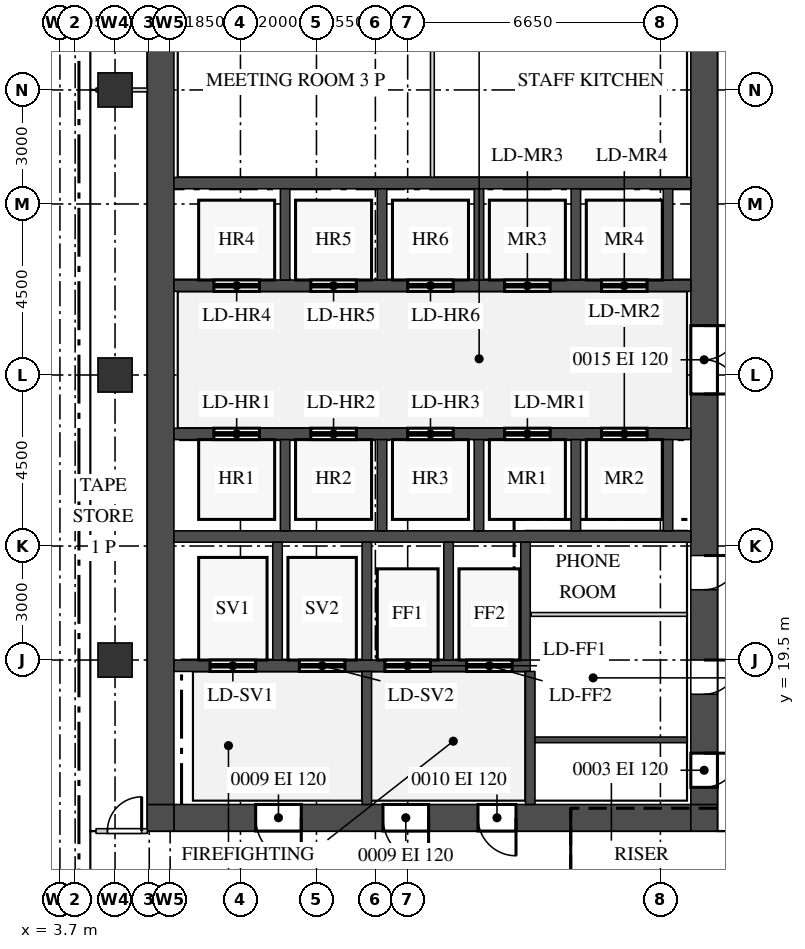
"""IFC4 building model, lengths in metres.
Left out: names, types, materials, properties, quantities, classifications, styles, units other than length and angle.
Written with IfcOpenShell. Run it as: python <this file> out.ifc"""

import sys

from ifc_helpers import new_model, si_unit, direction, frame, frame_2d, origin, origin_2d, place, context, subcontext, project, spatial, rectangle, extrude, source, transform, mapped, element, fill, save


model = new_model("IFC4")
c1 = context("Model", 3, precision=1e-05, world=origin(), true_north=direction((0.0, 1.0)))
c2 = subcontext(c1, "Body", "Model", "MODEL_VIEW")
j1 = project(units=[si_unit("LENGTHUNIT", "METRE"), si_unit("PLANEANGLEUNIT", "RADIAN")], contexts=[c1])
p1 = place(None, origin())
s1 = spatial("IfcSite", under=j1, at=p1, CompositionType="ELEMENT")
p2 = place(p1, origin())
s2 = spatial("IfcBuilding", under=s1, at=p2, CompositionType="ELEMENT")
p3 = place(p2, frame((0.0, 0.0, 246.2)))
s3 = spatial("IfcBuildingStorey", under=s2, at=p3, CompositionType="ELEMENT", Elevation=246.2)
m1 = source(origin(), c2, "Body", "SweptSolid", [
    extrude(rectangle(XDim=13.6, YDim=0.7, at=frame_2d((6.8, 0.0))), origin(), (0.0, 0.0, 1.0), 3.75),
])
p4 = place(p3, frame((6.7, 15.35, 0.0), z_axis=(0.0, 0.0, 1.0), x_axis=(1.0, 0.0, 0.0)))
e1 = element("IfcWall", 1, at=p4, inside=s3, PredefinedType="SHEAR", context=c2, shape_type="MappedRepresentation", body=[
    mapped(m1, transform((0.0, 0.0, 0.0))),
])
m2 = source(origin(), c2, "Body", "SweptSolid", [
    extrude(rectangle(XDim=1.2, YDim=2.1, at=frame_2d((0.6, 1.05))), frame((0.0, 0.36, 0.0), z_axis=(0.0, -1.0, 0.0), x_axis=(1.0, 0.0, 0.0)), (0.0, 0.0, 1.0), 0.72),
])
p5 = place(p4, frame((5.5, 0.0, 0.0)))
e2 = element("IfcOpeningElement", 2, at=p5, cuts=e1, PredefinedType="OPENING", context=c2, shape_type="MappedRepresentation", body=[
    mapped(m2, transform((0.0, 0.0, 0.0))),
])
p6 = place(p4, frame((2.15, 0.0, 0.0)))
e3 = element("IfcOpeningElement", 3, at=p6, cuts=e1, PredefinedType="OPENING", context=c2, shape_type="MappedRepresentation", body=[
    mapped(m2, transform((0.0, 0.0, 0.0))),
])
m3 = source(origin(), c2, "Body", "SweptSolid", [
    extrude(rectangle(XDim=1.0, YDim=2.1, at=frame_2d((0.5, 1.05))), frame((0.0, 0.36, 0.0), z_axis=(0.0, -1.0, 0.0), x_axis=(1.0, 0.0, 0.0)), (0.0, 0.0, 1.0), 0.72),
])
p7 = place(p4, frame((8.0, 0.0, 0.0)))
e4 = element("IfcOpeningElement", 4, at=p7, cuts=e1, PredefinedType="OPENING", context=c2, shape_type="MappedRepresentation", body=[
    mapped(m3, transform((0.0, 0.0, 0.0))),
])
m4 = source(origin(), c2, "Body", "SweptSolid", [
    extrude(rectangle(XDim=0.7, YDim=0.7, at=frame_2d((0.35, 0.0))), origin(), (0.0, 0.0, 1.0), 3.75),
])
for number, where, z_axis, x_axis in (
    (5, (20.3, 15.35, 0.0), (0.0, 0.0, 1.0), (1.0, 0.0, 0.0)),
    (6, (6.0, 15.35, 0.0), (0.0, 0.0, 1.0), (1.0, 0.0, 0.0)),
):
    element("IfcWall", number, at=place(p3, frame(where, z_axis=z_axis, x_axis=x_axis)), inside=s3, PredefinedType="SHEAR", context=c2, shape_type="MappedRepresentation", body=[
        mapped(m4, transform((0.0, 0.0, 0.0))),
    ])
m5 = source(origin(), c2, "Body", "SweptSolid", [
    extrude(rectangle(XDim=22.6, YDim=0.7, at=frame_2d((11.3, 0.0))), origin(), (0.0, 0.0, 1.0), 3.75),
])
p8 = place(p3, frame((20.65, 15.7, 0.0), z_axis=(0.0, 0.0, 1.0), x_axis=(0.0, 1.0, 0.0)))
e7 = element("IfcWall", 7, at=p8, inside=s3, PredefinedType="SHEAR", context=c2, shape_type="MappedRepresentation", body=[
    mapped(m5, transform((0.0, 0.0, 0.0))),
])
m6 = source(origin(), c2, "Body", "SweptSolid", [
    extrude(rectangle(XDim=1.8, YDim=2.1, at=frame_2d((0.9, 1.05))), frame((0.0, 0.36, 0.0), z_axis=(0.0, -1.0, 0.0), x_axis=(1.0, 0.0, 0.0)), (0.0, 0.0, 1.0), 0.72),
])
p9 = place(p8, frame((10.8, 0.0, 0.0)))
e8 = element("IfcOpeningElement", 8, at=p9, cuts=e7, PredefinedType="OPENING", context=c2, shape_type="MappedRepresentation", body=[
    mapped(m6, transform((0.0, 0.0, 0.0))),
])
m7 = source(origin(), c2, "Body", "SweptSolid", [
    extrude(rectangle(XDim=0.9, YDim=2.1, at=frame_2d((0.45, 1.05))), frame((0.0, 0.36, 0.0), z_axis=(0.0, -1.0, 0.0), x_axis=(1.0, 0.0, 0.0)), (0.0, 0.0, 1.0), 0.72),
])
p10 = place(p8, frame((0.45, 0.0, 0.0)))
e9 = element("IfcOpeningElement", 9, at=p10, cuts=e7, PredefinedType="OPENING", context=c2, shape_type="MappedRepresentation", body=[
    mapped(m7, transform((0.0, 0.0, 0.0))),
])
p11 = place(p8, frame((2.9, 0.0, 0.0)))
e10 = element("IfcOpeningElement", 10, at=p11, cuts=e7, PredefinedType="OPENING", context=c2, shape_type="MappedRepresentation", body=[
    mapped(m7, transform((0.0, 0.0, 0.0))),
])
p12 = place(p8, frame((5.65, 0.0, 0.0)))
e11 = element("IfcOpeningElement", 11, at=p12, cuts=e7, PredefinedType="OPENING", context=c2, shape_type="MappedRepresentation", body=[
    mapped(m7, transform((0.0, 0.0, 0.0))),
])
p13 = place(p3, frame((6.35, 15.7, 0.0), z_axis=(0.0, 0.0, 1.0), x_axis=(0.0, 1.0, 0.0)))
e12 = element("IfcWall", 12, at=p13, inside=s3, PredefinedType="SHEAR", context=c2, shape_type="MappedRepresentation", body=[
    mapped(m5, transform((0.0, 0.0, 0.0))),
])
m8 = source(origin(), c2, "Body", "SweptSolid", [
    extrude(rectangle(XDim=13.6, YDim=0.3, at=frame_2d((6.8, 0.0))), origin(), (0.0, 0.0, 1.0), 3.75),
])
p14 = place(p3, frame((6.7, 22.75, 0.0), z_axis=(0.0, 0.0, 1.0), x_axis=(1.0, 0.0, 0.0)))
e13 = element("IfcWall", 13, at=p14, inside=s3, PredefinedType="STANDARD", context=c2, shape_type="MappedRepresentation", body=[
    mapped(m8, transform((0.0, 0.0, 0.0))),
])
m9 = source(origin(), c2, "Body", "SweptSolid", [
    extrude(rectangle(XDim=9.375, YDim=0.3, at=frame_2d((4.688, 0.0))), origin(), (0.0, 0.0, 1.0), 3.75),
])
p15 = place(p3, frame((6.7, 19.35, 0.0), z_axis=(0.0, 0.0, 1.0), x_axis=(1.0, 0.0, 0.0)))
e14 = element("IfcWall", 14, at=p15, inside=s3, PredefinedType="STANDARD", context=c2, shape_type="MappedRepresentation", body=[
    mapped(m9, transform((0.0, 0.0, 0.0))),
])
m10 = source(origin(), c2, "Body", "SweptSolid", [
    extrude(rectangle(XDim=1.2, YDim=2.1, at=frame_2d((0.6, 1.05))), frame((0.0, 0.16, 0.0), z_axis=(0.0, -1.0, 0.0), x_axis=(1.0, 0.0, 0.0)), (0.0, 0.0, 1.0), 0.32),
])
p16 = place(p15, frame((0.95, 0.0, 0.0)))
e15 = element("IfcOpeningElement", 15, at=p16, cuts=e14, PredefinedType="OPENING", context=c2, shape_type="MappedRepresentation", body=[
    mapped(m10, transform((0.0, 0.0, 0.0))),
])
p17 = place(p15, frame((3.3, 0.0, 0.0)))
e16 = element("IfcOpeningElement", 16, at=p17, cuts=e14, PredefinedType="OPENING", context=c2, shape_type="MappedRepresentation", body=[
    mapped(m10, transform((0.0, 0.0, 0.0))),
])
p18 = place(p15, frame((5.55, 0.0, 0.0)))
e17 = element("IfcOpeningElement", 17, at=p18, cuts=e14, PredefinedType="OPENING", context=c2, shape_type="MappedRepresentation", body=[
    mapped(m10, transform((0.0, 0.0, 0.0))),
])
p19 = place(p15, frame((7.7, 0.0, 0.0)))
e18 = element("IfcOpeningElement", 18, at=p19, cuts=e14, PredefinedType="OPENING", context=c2, shape_type="MappedRepresentation", body=[
    mapped(m10, transform((0.0, 0.0, 0.0))),
])
p20 = place(p3, frame((6.7, 32.05, 0.0), z_axis=(0.0, 0.0, 1.0), x_axis=(1.0, 0.0, 0.0)))
e19 = element("IfcWall", 19, at=p20, inside=s3, PredefinedType="STANDARD", context=c2, shape_type="MappedRepresentation", body=[
    mapped(m8, transform((0.0, 0.0, 0.0))),
])
p21 = place(p3, frame((6.7, 29.35, 0.0), z_axis=(0.0, 0.0, 1.0), x_axis=(1.0, 0.0, 0.0)))
e20 = element("IfcWall", 20, at=p21, inside=s3, PredefinedType="STANDARD", context=c2, shape_type="MappedRepresentation", body=[
    mapped(m8, transform((0.0, 0.0, 0.0))),
])
p22 = place(p21, frame((1.05, 0.0, 0.0)))
e21 = element("IfcOpeningElement", 21, at=p22, cuts=e20, PredefinedType="OPENING", context=c2, shape_type="MappedRepresentation", body=[
    mapped(m10, transform((0.0, 0.0, 0.0))),
])
p23 = place(p21, frame((3.6, 0.0, 0.0)))
e22 = element("IfcOpeningElement", 22, at=p23, cuts=e20, PredefinedType="OPENING", context=c2, shape_type="MappedRepresentation", body=[
    mapped(m10, transform((0.0, 0.0, 0.0))),
])
p24 = place(p21, frame((6.15, 0.0, 0.0)))
e23 = element("IfcOpeningElement", 23, at=p24, cuts=e20, PredefinedType="OPENING", context=c2, shape_type="MappedRepresentation", body=[
    mapped(m10, transform((0.0, 0.0, 0.0))),
])
p25 = place(p21, frame((8.7, 0.0, 0.0)))
e24 = element("IfcOpeningElement", 24, at=p25, cuts=e20, PredefinedType="OPENING", context=c2, shape_type="MappedRepresentation", body=[
    mapped(m10, transform((0.0, 0.0, 0.0))),
])
p26 = place(p21, frame((11.25, 0.0, 0.0)))
e25 = element("IfcOpeningElement", 25, at=p26, cuts=e20, PredefinedType="OPENING", context=c2, shape_type="MappedRepresentation", body=[
    mapped(m10, transform((0.0, 0.0, 0.0))),
])
p27 = place(p3, frame((6.7, 25.45, 0.0), z_axis=(0.0, 0.0, 1.0), x_axis=(1.0, 0.0, 0.0)))
e26 = element("IfcWall", 26, at=p27, inside=s3, PredefinedType="STANDARD", context=c2, shape_type="MappedRepresentation", body=[
    mapped(m8, transform((0.0, 0.0, 0.0))),
])
p28 = place(p27, frame((1.05, 0.0, 0.0)))
e27 = element("IfcOpeningElement", 27, at=p28, cuts=e26, PredefinedType="OPENING", context=c2, shape_type="MappedRepresentation", body=[
    mapped(m10, transform((0.0, 0.0, 0.0))),
])
p29 = place(p27, frame((3.6, 0.0, 0.0)))
e28 = element("IfcOpeningElement", 28, at=p29, cuts=e26, PredefinedType="OPENING", context=c2, shape_type="MappedRepresentation", body=[
    mapped(m10, transform((0.0, 0.0, 0.0))),
])
p30 = place(p27, frame((6.15, 0.0, 0.0)))
e29 = element("IfcOpeningElement", 29, at=p30, cuts=e26, PredefinedType="OPENING", context=c2, shape_type="MappedRepresentation", body=[
    mapped(m10, transform((0.0, 0.0, 0.0))),
])
p31 = place(p27, frame((8.7, 0.0, 0.0)))
e30 = element("IfcOpeningElement", 30, at=p31, cuts=e26, PredefinedType="OPENING", context=c2, shape_type="MappedRepresentation", body=[
    mapped(m10, transform((0.0, 0.0, 0.0))),
])
p32 = place(p27, frame((11.25, 0.0, 0.0)))
e31 = element("IfcOpeningElement", 31, at=p32, cuts=e26, PredefinedType="OPENING", context=c2, shape_type="MappedRepresentation", body=[
    mapped(m10, transform((0.0, 0.0, 0.0))),
])
m11 = source(origin(), c2, "Body", "SweptSolid", [
    extrude(rectangle(XDim=3.1, YDim=0.25, at=frame_2d((1.55, 0.0))), origin(), (0.0, 0.0, 1.0), 3.75),
])
for number, where, z_axis, x_axis in (
    (32, (9.425, 19.5, 0.0), (0.0, 0.0, 1.0), (0.0, 1.0, 0.0)),
    (33, (11.775, 19.5, 0.0), (0.0, 0.0, 1.0), (0.0, 1.0, 0.0)),
    (34, (13.925, 19.5, 0.0), (0.0, 0.0, 1.0), (0.0, 1.0, 0.0)),
    (35, (15.95, 19.5, 0.0), (0.0, 0.0, 1.0), (0.0, 1.0, 0.0)),
):
    element("IfcWall", number, at=place(p3, frame(where, z_axis=z_axis, x_axis=x_axis)), inside=s3, PredefinedType="STANDARD", context=c2, shape_type="MappedRepresentation", body=[
        mapped(m11, transform((0.0, 0.0, 0.0))),
    ])
m12 = source(origin(), c2, "Body", "SweptSolid", [
    extrude(rectangle(XDim=2.4, YDim=0.25, at=frame_2d((1.2, 0.0))), origin(), (0.0, 0.0, 1.0), 3.75),
])
for number, where, z_axis, x_axis in (
    (36, (17.275, 29.5, 0.0), (0.0, 0.0, 1.0), (0.0, 1.0, 0.0)),
    (37, (19.7, 29.5, 0.0), (0.0, 0.0, 1.0), (0.0, 1.0, 0.0)),
    (38, (9.625, 29.5, 0.0), (0.0, 0.0, 1.0), (0.0, 1.0, 0.0)),
    (39, (12.175, 29.5, 0.0), (0.0, 0.0, 1.0), (0.0, 1.0, 0.0)),
    (40, (14.725, 29.5, 0.0), (0.0, 0.0, 1.0), (0.0, 1.0, 0.0)),
):
    element("IfcWall", number, at=place(p3, frame(where, z_axis=z_axis, x_axis=x_axis)), inside=s3, PredefinedType="STANDARD", context=c2, shape_type="MappedRepresentation", body=[
        mapped(m12, transform((0.0, 0.0, 0.0))),
    ])
m13 = source(origin(), c2, "Body", "SweptSolid", [
    extrude(rectangle(XDim=2.4, YDim=0.25, at=frame_2d((1.2, 0.0))), origin(), (0.0, 0.0, 1.0), 3.75),
])
for number, where, z_axis, x_axis in (
    (41, (17.275, 22.9, 0.0), (0.0, 0.0, 1.0), (0.0, 1.0, 0.0)),
    (42, (19.7, 22.9, 0.0), (0.0, 0.0, 1.0), (0.0, 1.0, 0.0)),
    (43, (9.625, 22.9, 0.0), (0.0, 0.0, 1.0), (0.0, 1.0, 0.0)),
    (44, (12.175, 22.9, 0.0), (0.0, 0.0, 1.0), (0.0, 1.0, 0.0)),
    (45, (14.725, 22.9, 0.0), (0.0, 0.0, 1.0), (0.0, 1.0, 0.0)),
):
    element("IfcWall", number, at=place(p3, frame(where, z_axis=z_axis, x_axis=x_axis)), inside=s3, PredefinedType="STANDARD", context=c2, shape_type="MappedRepresentation", body=[
        mapped(m13, transform((0.0, 0.0, 0.0))),
    ])
m14 = source(origin(), c2, "Body", "SweptSolid", [
    extrude(rectangle(XDim=3.5, YDim=0.25, at=frame_2d((1.75, 0.0))), origin(), (0.0, 0.0, 1.0), 3.75),
])
for number, where, z_axis, x_axis in (
    (46, (16.075, 15.7, 0.0), (0.0, 0.0, 1.0), (0.0, 1.0, 0.0)),
    (47, (11.775, 15.7, 0.0), (0.0, 0.0, 1.0), (0.0, 1.0, 0.0)),
):
    element("IfcWall", number, at=place(p3, frame(where, z_axis=z_axis, x_axis=x_axis)), inside=s3, PredefinedType="STANDARD", context=c2, shape_type="MappedRepresentation", body=[
        mapped(m14, transform((0.0, 0.0, 0.0))),
    ])
m15 = source(origin(), c2, "Body", "SweptSolid", [
    extrude(rectangle(XDim=0.9, YDim=0.9, at=origin_2d()), origin(), (0.0, 0.0, 1.0), 3.75),
])
for number, where, z_axis, x_axis in (
    (48, (5.15, 19.5, 0.0), (0.0, 0.0, 1.0), (1.0, 0.0, 0.0)),
    (49, (5.15, 27.0, 0.0), (0.0, 0.0, 1.0), (1.0, 0.0, 0.0)),
    (50, (5.15, 34.5, 0.0), (0.0, 0.0, 1.0), (1.0, 0.0, 0.0)),
):
    element("IfcColumn", number, at=place(p3, frame(where, z_axis=z_axis, x_axis=x_axis)), inside=s3, PredefinedType="COLUMN", context=c2, shape_type="MappedRepresentation", body=[
        mapped(m15, transform((0.0, 0.0, 0.0))),
    ])
m16 = source(origin(), c2, "Body", "SweptSolid", [
    extrude(rectangle(XDim=1.35, YDim=0.125, at=frame_2d((0.675, 0.0))), origin(), (0.0, 0.0, 1.0), 3.8),
])
p33 = place(p3, frame((4.65, 15.0, 0.0), z_axis=(0.0, 0.0, 1.0), x_axis=(1.0, 0.0, 0.0)))
e51 = element("IfcWall", 51, at=p33, inside=s3, PredefinedType="PARTITIONING", context=c2, shape_type="MappedRepresentation", body=[
    mapped(m16, transform((0.0, 0.0, 0.0))),
])
m17 = source(origin(), c2, "Body", "SweptSolid", [
    extrude(rectangle(XDim=0.9, YDim=2.1, at=frame_2d((0.45, 1.05))), frame((0.0, 0.073, 0.0), z_axis=(0.0, -1.0, 0.0), x_axis=(1.0, 0.0, 0.0)), (0.0, 0.0, 1.0), 0.145),
])
p34 = place(p33, frame((0.3, 0.0, 0.0)))
e52 = element("IfcOpeningElement", 52, at=p34, cuts=e51, PredefinedType="OPENING", context=c2, shape_type="MappedRepresentation", body=[
    mapped(m17, transform((0.0, 0.0, 0.0))),
])
m18 = source(origin(), c2, "Body", "SweptSolid", [
    extrude(rectangle(XDim=4.0, YDim=0.15, at=frame_2d((2.0, 0.0))), origin(), (0.0, 0.0, 1.0), 3.8),
])
p35 = place(p3, frame((16.2, 17.4, 0.0), z_axis=(0.0, 0.0, 1.0), x_axis=(1.0, 0.0, 0.0)))
e53 = element("IfcWall", 53, at=p35, inside=s3, PredefinedType="PARTITIONING", context=c2, shape_type="MappedRepresentation", body=[
    mapped(m18, transform((0.0, 0.0, 0.0))),
])
m19 = source(origin(), c2, "Body", "SweptSolid", [
    extrude(rectangle(XDim=4.1, YDim=0.1, at=frame_2d((2.05, 0.0))), origin(), (0.0, 0.0, 1.0), 3.8),
])
p36 = place(p3, frame((16.1, 20.7, 0.0), z_axis=(0.0, 0.0, 1.0), x_axis=(1.0, 0.0, 0.0)))
e54 = element("IfcWall", 54, at=p36, inside=s3, PredefinedType="PARTITIONING", context=c2, shape_type="MappedRepresentation", body=[
    mapped(m19, transform((0.0, 0.0, 0.0))),
])
m20 = source(origin(), c2, "Body", "SweptSolid", [
    extrude(rectangle(XDim=6.0, YDim=0.1, at=frame_2d((3.0, 0.0))), origin(), (0.0, 0.0, 1.0), 3.8),
])
p37 = place(p3, frame((13.5, 32.2, 0.0), z_axis=(0.0, 0.0, 1.0), x_axis=(0.0, 1.0, 0.0)))
e55 = element("IfcWall", 55, at=p37, inside=s3, PredefinedType="PARTITIONING", context=c2, shape_type="MappedRepresentation", body=[
    mapped(m20, transform((0.0, 0.0, 0.0))),
])
m21 = source(origin(), c2, "Body", "SweptSolid", [
    extrude(rectangle(XDim=1.35, YDim=0.1, at=frame_2d((0.675, 0.0))), origin(), (0.0, 0.0, 1.0), 3.8),
])
p38 = place(p3, frame((4.65, 34.5, 0.0), z_axis=(0.0, 0.0, 1.0), x_axis=(1.0, 0.0, 0.0)))
e56 = element("IfcWall", 56, at=p38, inside=s3, PredefinedType="PARTITIONING", context=c2, shape_type="MappedRepresentation", body=[
    mapped(m21, transform((0.0, 0.0, 0.0))),
])
m22 = source(origin(), c2, "Body", "SweptSolid", [
    extrude(rectangle(XDim=1.8, YDim=2.1, at=frame_2d((0.9, 1.05))), frame((0.0, 0.3, 0.0), z_axis=(0.0, -1.0, 0.0), x_axis=(1.0, 0.0, 0.0)), (0.0, 0.0, 1.0), 0.6),
])
p39 = place(p9, origin())
e57 = element("IfcDoor", 57, at=p39, inside=s3, OperationType="DOUBLE_DOOR_SINGLE_SWING", PredefinedType="DOOR", context=c2, shape_type="MappedRepresentation", body=[
    mapped(m22, transform((0.0, 0.0, 0.0))),
])
fill(e8, e57)
m23 = source(origin(), c2, "Body", "SweptSolid", [
    extrude(rectangle(XDim=0.9, YDim=2.1, at=frame_2d((0.45, 1.05))), frame((0.0, 0.3, 0.0), z_axis=(0.0, -1.0, 0.0), x_axis=(1.0, 0.0, 0.0)), (0.0, 0.0, 1.0), 0.6),
])
p40 = place(p10, origin())
e58 = element("IfcDoor", 58, at=p40, inside=s3, OperationType="SINGLE_SWING_RIGHT", PredefinedType="DOOR", context=c2, shape_type="MappedRepresentation", body=[
    mapped(m23, transform((0.0, 0.0, 0.0))),
])
fill(e9, e58)
p41 = place(p11, origin())
e59 = element("IfcDoor", 59, at=p41, inside=s3, OperationType="SINGLE_SWING_RIGHT", PredefinedType="DOOR", context=c2, shape_type="MappedRepresentation", body=[
    mapped(m23, transform((0.0, 0.0, 0.0))),
])
fill(e10, e59)
p42 = place(p12, origin())
e60 = element("IfcDoor", 60, at=p42, inside=s3, OperationType="SINGLE_SWING_RIGHT", PredefinedType="DOOR", context=c2, shape_type="MappedRepresentation", body=[
    mapped(m23, transform((0.0, 0.0, 0.0))),
])
fill(e11, e60)
m24 = source(origin(), c2, "Body", "SweptSolid", [
    extrude(rectangle(XDim=1.2, YDim=2.1, at=frame_2d((0.6, 1.05))), frame((0.0, 0.3, 0.0), z_axis=(0.0, -1.0, 0.0), x_axis=(1.0, 0.0, 0.0)), (0.0, 0.0, 1.0), 0.6),
])
p43 = place(p5, origin())
e61 = element("IfcDoor", 61, at=p43, inside=s3, OperationType="SINGLE_SWING_RIGHT", PredefinedType="DOOR", context=c2, shape_type="MappedRepresentation", body=[
    mapped(m24, transform((0.0, 0.0, 0.0))),
])
fill(e2, e61)
p44 = place(p6, origin())
e62 = element("IfcDoor", 62, at=p44, inside=s3, OperationType="SINGLE_SWING_RIGHT", PredefinedType="DOOR", context=c2, shape_type="MappedRepresentation", body=[
    mapped(m24, transform((0.0, 0.0, 0.0))),
])
fill(e3, e62)
m25 = source(origin(), c2, "Body", "SweptSolid", [
    extrude(rectangle(XDim=1.0, YDim=2.1, at=frame_2d((0.5, 1.05))), frame((0.0, 0.3, 0.0), z_axis=(0.0, -1.0, 0.0), x_axis=(1.0, 0.0, 0.0)), (0.0, 0.0, 1.0), 0.6),
])
p45 = place(p7, origin())
e63 = element("IfcDoor", 63, at=p45, inside=s3, OperationType="SINGLE_SWING_RIGHT", PredefinedType="DOOR", context=c2, shape_type="MappedRepresentation", body=[
    mapped(m25, transform((0.0, 0.0, 0.0))),
])
fill(e4, e63)
m26 = source(origin(), c2, "Body", "SweptSolid", [
    extrude(rectangle(XDim=0.9, YDim=2.1, at=frame_2d((0.45, 1.05))), frame((0.0, 0.025, 0.0), z_axis=(0.0, -1.0, 0.0), x_axis=(1.0, 0.0, 0.0)), (0.0, 0.0, 1.0), 0.05),
])
p46 = place(p34, origin())
e64 = element("IfcDoor", 64, at=p46, inside=s3, OperationType="SINGLE_SWING_LEFT", PredefinedType="DOOR", context=c2, shape_type="MappedRepresentation", body=[
    mapped(m26, transform((0.0, 0.0, 0.0))),
])
fill(e52, e64)
m27 = source(origin(), c2, "Body", "SweptSolid", [
    extrude(rectangle(XDim=1.2, YDim=2.1, at=frame_2d((0.6, 1.05))), frame((0.0, 0.025, 0.0), z_axis=(0.0, -1.0, 0.0), x_axis=(1.0, 0.0, 0.0)), (0.0, 0.0, 1.0), 0.05),
])
p47 = place(p28, origin())
e65 = element("IfcDoor", 65, at=p47, inside=s3, OperationType="DOUBLE_DOOR_SLIDING", PredefinedType="DOOR", context=c2, shape_type="MappedRepresentation", body=[
    mapped(m27, transform((0.0, 0.0, 0.0))),
])
fill(e27, e65)
p48 = place(p29, origin())
e66 = element("IfcDoor", 66, at=p48, inside=s3, OperationType="DOUBLE_DOOR_SLIDING", PredefinedType="DOOR", context=c2, shape_type="MappedRepresentation", body=[
    mapped(m27, transform((0.0, 0.0, 0.0))),
])
fill(e28, e66)
p49 = place(p30, origin())
e67 = element("IfcDoor", 67, at=p49, inside=s3, OperationType="DOUBLE_DOOR_SLIDING", PredefinedType="DOOR", context=c2, shape_type="MappedRepresentation", body=[
    mapped(m27, transform((0.0, 0.0, 0.0))),
])
fill(e29, e67)
p50 = place(p31, origin())
e68 = element("IfcDoor", 68, at=p50, inside=s3, OperationType="DOUBLE_DOOR_SLIDING", PredefinedType="DOOR", context=c2, shape_type="MappedRepresentation", body=[
    mapped(m27, transform((0.0, 0.0, 0.0))),
])
fill(e30, e68)
p51 = place(p32, origin())
e69 = element("IfcDoor", 69, at=p51, inside=s3, OperationType="DOUBLE_DOOR_SLIDING", PredefinedType="DOOR", context=c2, shape_type="MappedRepresentation", body=[
    mapped(m27, transform((0.0, 0.0, 0.0))),
])
fill(e31, e69)
p52 = place(p22, origin())
e70 = element("IfcDoor", 70, at=p52, inside=s3, OperationType="DOUBLE_DOOR_SLIDING", PredefinedType="DOOR", context=c2, shape_type="MappedRepresentation", body=[
    mapped(m27, transform((0.0, 0.0, 0.0))),
])
fill(e21, e70)
p53 = place(p23, origin())
e71 = element("IfcDoor", 71, at=p53, inside=s3, OperationType="DOUBLE_DOOR_SLIDING", PredefinedType="DOOR", context=c2, shape_type="MappedRepresentation", body=[
    mapped(m27, transform((0.0, 0.0, 0.0))),
])
fill(e22, e71)
p54 = place(p24, origin())
e72 = element("IfcDoor", 72, at=p54, inside=s3, OperationType="DOUBLE_DOOR_SLIDING", PredefinedType="DOOR", context=c2, shape_type="MappedRepresentation", body=[
    mapped(m27, transform((0.0, 0.0, 0.0))),
])
fill(e23, e72)
p55 = place(p25, origin())
e73 = element("IfcDoor", 73, at=p55, inside=s3, OperationType="DOUBLE_DOOR_SLIDING", PredefinedType="DOOR", context=c2, shape_type="MappedRepresentation", body=[
    mapped(m27, transform((0.0, 0.0, 0.0))),
])
fill(e24, e73)
p56 = place(p26, origin())
e74 = element("IfcDoor", 74, at=p56, inside=s3, OperationType="DOUBLE_DOOR_SLIDING", PredefinedType="DOOR", context=c2, shape_type="MappedRepresentation", body=[
    mapped(m27, transform((0.0, 0.0, 0.0))),
])
fill(e25, e74)
p57 = place(p16, origin())
e75 = element("IfcDoor", 75, at=p57, inside=s3, OperationType="DOUBLE_DOOR_SLIDING", PredefinedType="DOOR", context=c2, shape_type="MappedRepresentation", body=[
    mapped(m27, transform((0.0, 0.0, 0.0))),
])
fill(e15, e75)
p58 = place(p17, origin())
e76 = element("IfcDoor", 76, at=p58, inside=s3, OperationType="DOUBLE_DOOR_SLIDING", PredefinedType="DOOR", context=c2, shape_type="MappedRepresentation", body=[
    mapped(m27, transform((0.0, 0.0, 0.0))),
])
fill(e16, e76)
p59 = place(p18, origin())
e77 = element("IfcDoor", 77, at=p59, inside=s3, OperationType="DOUBLE_DOOR_SLIDING", PredefinedType="DOOR", context=c2, shape_type="MappedRepresentation", body=[
    mapped(m27, transform((0.0, 0.0, 0.0))),
])
fill(e17, e77)
p60 = place(p19, origin())
e78 = element("IfcDoor", 78, at=p60, inside=s3, OperationType="DOUBLE_DOOR_SLIDING", PredefinedType="DOOR", context=c2, shape_type="MappedRepresentation", body=[
    mapped(m27, transform((0.0, 0.0, 0.0))),
])
fill(e18, e78)
save(model, sys.argv[1])
